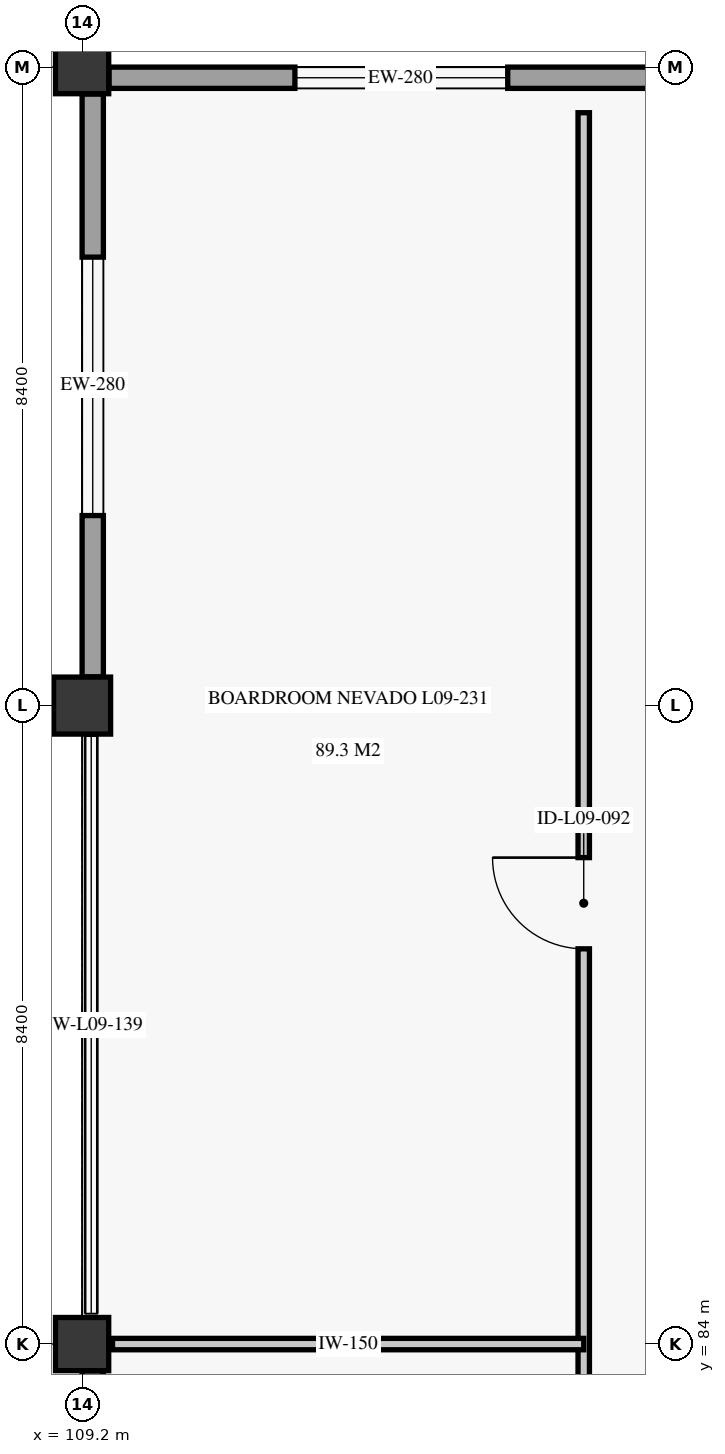
"""IFC4 building model, lengths in metres.
Left out: names, types, materials, properties, quantities, classifications, styles, units other than length and angle.
Written with IfcOpenShell. Run it as: python <this file> out.ifc"""

import sys

from ifc_helpers import new_model, si_unit, direction, frame, frame_2d, origin, origin_2d, place, context, subcontext, project, spatial, rectangle, extrude, element, fill, save


model = new_model("IFC4")
c1 = context("Model", 3, precision=1e-05, world=origin(), true_north=direction((0.0, 1.0)))
c2 = subcontext(c1, "Body", "Model", "MODEL_VIEW")
j1 = project(units=[si_unit("LENGTHUNIT", "METRE"), si_unit("PLANEANGLEUNIT", "RADIAN")], contexts=[c1])
p1 = place(None, origin())
s1 = spatial("IfcSite", under=j1, at=p1, CompositionType="ELEMENT")
p2 = place(p1, origin())
s2 = spatial("IfcBuilding", under=s1, at=p2, CompositionType="ELEMENT")
p3 = place(p2, frame((0.0, 0.0, 38.7)))
s3 = spatial("IfcBuildingStorey", under=s2, at=p3, CompositionType="ELEMENT", Elevation=38.7)
p4 = place(p3, frame((109.2, 84.0, 0.0), z_axis=(0.0, 0.0, 1.0), x_axis=(1.0, 0.0, 0.0)))
e1 = element("IfcColumn", 1, at=p4, inside=s3, PredefinedType="COLUMN", context=c2, shape_type="SweptSolid", body=[
    extrude(rectangle(XDim=0.7, YDim=0.7, at=origin_2d()), origin(), (0.0, 0.0, 1.0), 3.72),
])
p5 = place(p3, frame((109.2, 92.4, 0.0), z_axis=(0.0, 0.0, 1.0), x_axis=(1.0, 0.0, 0.0)))
e2 = element("IfcColumn", 2, at=p5, inside=s3, PredefinedType="COLUMN", context=c2, shape_type="SweptSolid", body=[
    extrude(rectangle(XDim=0.75, YDim=0.75, at=origin_2d()), origin(), (0.0, 0.0, 1.0), 3.72),
])
p6 = place(p3, frame((109.2, 100.8, 0.0), z_axis=(0.0, 0.0, 1.0), x_axis=(1.0, 0.0, 0.0)))
e3 = element("IfcColumn", 3, at=p6, inside=s3, PredefinedType="COLUMN", context=c2, shape_type="SweptSolid", body=[
    extrude(rectangle(XDim=0.7, YDim=0.7, at=origin_2d()), origin(), (0.0, 0.0, 1.0), 3.72),
])
p7 = place(p3, frame((109.554, 100.66, 0.0), z_axis=(0.0, 0.0, 1.0), x_axis=(1.0, 0.0, 0.0)))
e4 = element("IfcWall", 4, at=p7, inside=s3, PredefinedType="SOLIDWALL", context=c2, shape_type="SweptSolid", body=[
    extrude(rectangle(XDim=7.668, YDim=0.28, at=frame_2d((3.834, 0.0))), origin(), (0.0, 0.0, 1.0), 3.04),
])
p8 = place(p7, frame((2.446, 0.0, 0.85)))
e5 = element("IfcOpeningElement", 5, at=p8, cuts=e4, PredefinedType="OPENING", context=c2, shape_type="SweptSolid", body=[
    extrude(rectangle(XDim=2.8, YDim=1.85, at=frame_2d((1.4, 0.925))), frame((0.0, 0.15, 0.0), z_axis=(0.0, -1.0, 0.0), x_axis=(1.0, 0.0, 0.0)), (0.0, 0.0, 1.0), 0.3),
])
p9 = place(p3, frame((109.34, 75.978, 0.0), z_axis=(0.0, 0.0, 1.0), x_axis=(0.0, 1.0, 0.0)))
e6 = element("IfcWall", 6, at=p9, inside=s3, PredefinedType="SOLIDWALL", context=c2, shape_type="SweptSolid", body=[
    extrude(rectangle(XDim=7.67, YDim=0.28, at=frame_2d((3.835, 0.0))), origin(), (0.0, 0.0, 1.0), 3.04),
])
p10 = place(p9, frame((3.222, 0.0, 0.85)))
e7 = element("IfcOpeningElement", 7, at=p10, cuts=e6, PredefinedType="OPENING", context=c2, shape_type="SweptSolid", body=[
    extrude(rectangle(XDim=1.2, YDim=1.6, at=frame_2d((0.6, 0.8))), frame((0.0, 0.15, 0.0), z_axis=(0.0, -1.0, 0.0), x_axis=(1.0, 0.0, 0.0)), (0.0, 0.0, 1.0), 0.3),
])
p11 = place(p3, frame((109.34, 92.778, 0.0), z_axis=(0.0, 0.0, 1.0), x_axis=(0.0, 1.0, 0.0)))
e8 = element("IfcWall", 8, at=p11, inside=s3, PredefinedType="SOLIDWALL", context=c2, shape_type="SweptSolid", body=[
    extrude(rectangle(XDim=7.668, YDim=0.28, at=frame_2d((3.834, 0.0))), origin(), (0.0, 0.0, 1.0), 3.04),
])
p12 = place(p11, frame((2.122, 0.0, 0.85)))
e9 = element("IfcOpeningElement", 9, at=p12, cuts=e8, PredefinedType="OPENING", context=c2, shape_type="SweptSolid", body=[
    extrude(rectangle(XDim=3.4, YDim=1.9, at=frame_2d((1.7, 0.95))), frame((0.0, 0.15, 0.0), z_axis=(0.0, -1.0, 0.0), x_axis=(1.0, 0.0, 0.0)), (0.0, 0.0, 1.0), 0.3),
])
p13 = place(p3, frame((115.8, 67.8, 0.0), z_axis=(0.0, 0.0, 1.0), x_axis=(0.0, 1.0, 0.0)))
e10 = element("IfcWall", 10, at=p13, inside=s3, PredefinedType="PARTITIONING", context=c2, shape_type="SweptSolid", body=[
    extrude(rectangle(XDim=32.4, YDim=0.15, at=frame_2d((16.2, 0.0))), origin(), (0.0, 0.0, 1.0), 3.34),
])
p14 = place(p13, frame((4.2, 0.0, 0.0)))
e11 = element("IfcOpeningElement", 11, at=p14, cuts=e10, PredefinedType="OPENING", context=c2, shape_type="SweptSolid", body=[
    extrude(rectangle(XDim=1.2, YDim=2.3, at=frame_2d((0.6, 1.15))), frame((0.0, 0.085, 0.0), z_axis=(0.0, -1.0, 0.0), x_axis=(1.0, 0.0, 0.0)), (0.0, 0.0, 1.0), 0.17),
])
p15 = place(p13, frame((21.4, 0.0, 0.0)))
e12 = element("IfcOpeningElement", 12, at=p15, cuts=e10, PredefinedType="OPENING", context=c2, shape_type="SweptSolid", body=[
    extrude(rectangle(XDim=1.2, YDim=2.3, at=frame_2d((0.6, 1.15))), frame((0.0, 0.085, 0.0), z_axis=(0.0, -1.0, 0.0), x_axis=(1.0, 0.0, 0.0)), (0.0, 0.0, 1.0), 0.17),
])
p16 = place(p3, frame((109.6, 84.0, 0.0), z_axis=(0.0, 0.0, 1.0), x_axis=(1.0, 0.0, 0.0)))
e13 = element("IfcWall", 13, at=p16, inside=s3, PredefinedType="PARTITIONING", context=c2, shape_type="SweptSolid", body=[
    extrude(rectangle(XDim=6.2, YDim=0.15, at=frame_2d((3.1, 0.0))), origin(), (0.0, 0.0, 1.0), 3.34),
])
p17 = place(p8, origin())
e14 = element("IfcWindow", 14, at=p17, inside=s3, PartitioningType="SINGLE_PANEL", PredefinedType="WINDOW", context=c2, shape_type="SweptSolid", body=[
    extrude(rectangle(XDim=2.8, YDim=1.85, at=frame_2d((1.4, 0.925))), frame((0.0, 0.03, 0.0), z_axis=(0.0, -1.0, 0.0), x_axis=(1.0, 0.0, 0.0)), (0.0, 0.0, 1.0), 0.06),
])
fill(e5, e14)
p18 = place(p12, origin())
e15 = element("IfcWindow", 15, at=p18, inside=s3, PartitioningType="SINGLE_PANEL", PredefinedType="WINDOW", context=c2, shape_type="SweptSolid", body=[
    extrude(rectangle(XDim=3.4, YDim=1.9, at=frame_2d((1.7, 0.95))), frame((0.0, 0.03, 0.0), z_axis=(0.0, -1.0, 0.0), x_axis=(1.0, 0.0, 0.0)), (0.0, 0.0, 1.0), 0.06),
])
fill(e9, e15)
p19 = place(p15, origin())
e16 = element("IfcDoor", 16, at=p19, inside=s3, OperationType="SINGLE_SWING_RIGHT", PredefinedType="DOOR", context=c2, shape_type="SweptSolid", body=[
    extrude(rectangle(XDim=1.2, YDim=2.3, at=frame_2d((0.6, 1.15))), frame((0.0, 0.025, 0.0), z_axis=(0.0, -1.0, 0.0), x_axis=(1.0, 0.0, 0.0)), (0.0, 0.0, 1.0), 0.05),
])
fill(e12, e16)
save(model, sys.argv[1])
